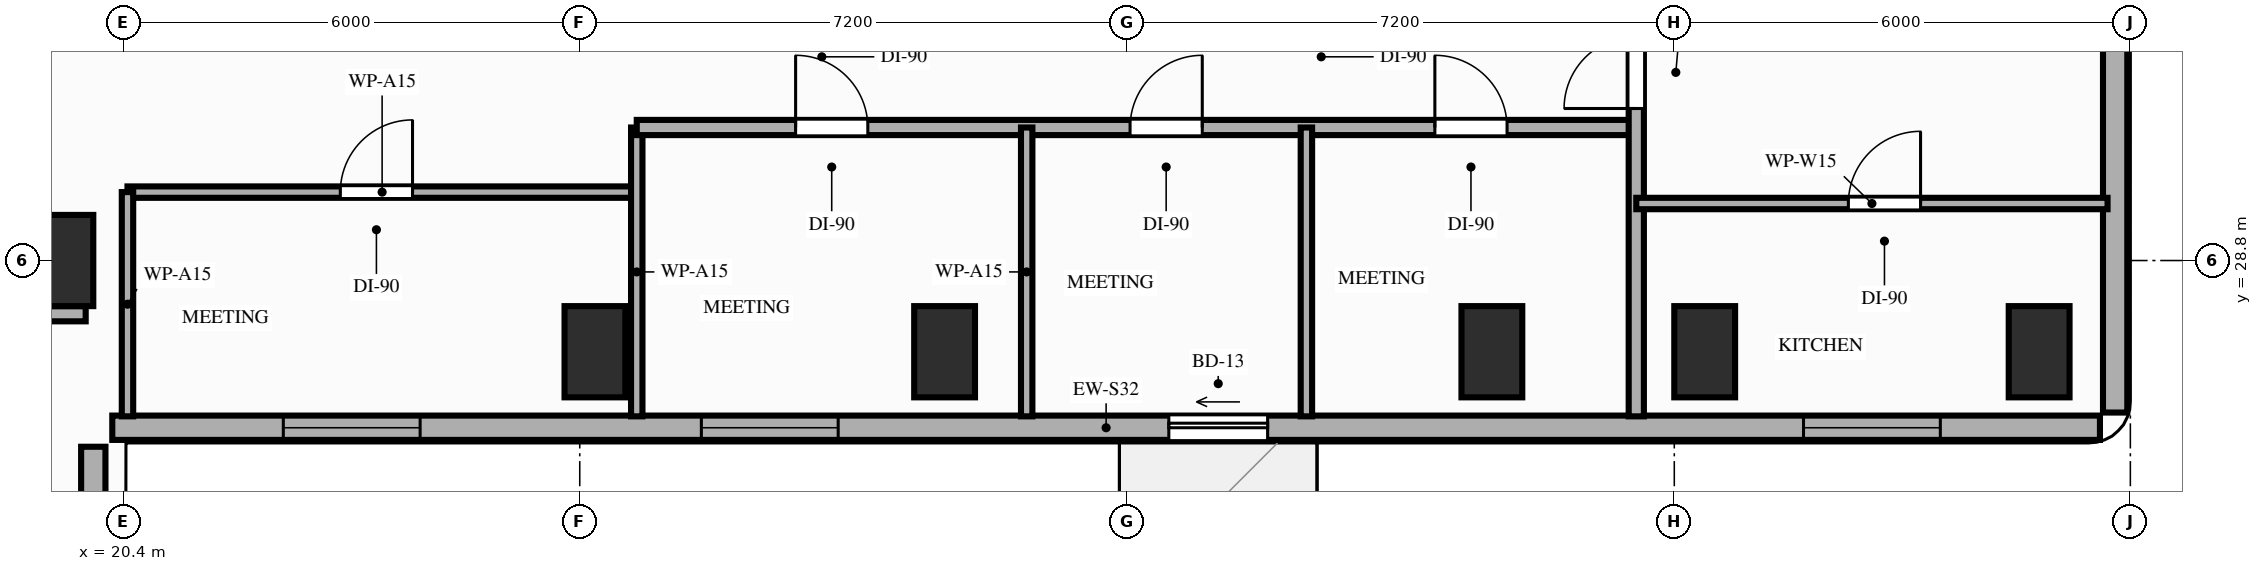
"""IFC4 building model, lengths in metres.
Left out: names, types, materials, properties, quantities, classifications, styles, units other than length and angle.
Written with IfcOpenShell. Run it as: python <this file> out.ifc"""

import sys

from ifc_helpers import new_model, si_unit, direction, frame, frame_2d, origin, origin_2d, place, context, subcontext, project, spatial, rectangle, extrude, element, fill, save


model = new_model("IFC4")
c1 = context("Model", 3, precision=1e-05, world=origin(), true_north=direction((0.0, 1.0)))
c2 = subcontext(c1, "Body", "Model", "MODEL_VIEW")
j1 = project(units=[si_unit("LENGTHUNIT", "METRE"), si_unit("PLANEANGLEUNIT", "RADIAN")], contexts=[c1])
p1 = place(None, origin())
s1 = spatial("IfcSite", under=j1, at=p1, CompositionType="ELEMENT")
p2 = place(p1, origin())
s2 = spatial("IfcBuilding", under=s1, at=p2, CompositionType="ELEMENT")
p3 = place(p2, frame((0.0, 0.0, 89.8)))
s3 = spatial("IfcBuildingStorey", under=s2, at=p3, CompositionType="ELEMENT", Elevation=89.8)
for number, where, z_axis, x_axis in (
    (1, (19.6, 28.8, 0.0), (0.0, 0.0, 1.0), (1.0, 0.0, 0.0)),
    (2, (26.6, 27.6, 0.0), (0.0, 0.0, 1.0), (1.0, 0.0, 0.0)),
    (3, (31.2, 27.6, 0.0), (0.0, 0.0, 1.0), (1.0, 0.0, 0.0)),
    (4, (38.4, 27.6, 0.0), (0.0, 0.0, 1.0), (1.0, 0.0, 0.0)),
    (5, (41.2, 27.6, 0.0), (0.0, 0.0, 1.0), (1.0, 0.0, 0.0)),
    (6, (45.6, 27.6, 0.0), (0.0, 0.0, 1.0), (1.0, 0.0, 0.0)),
):
    element("IfcColumn", number, at=place(p3, frame(where, z_axis=z_axis, x_axis=x_axis)), inside=s3, PredefinedType="COLUMN", context=c2, shape_type="SweptSolid", body=[
        extrude(rectangle(XDim=0.8, YDim=1.2, at=origin_2d()), origin(), (0.0, 0.0, 1.0), 3.2),
    ])
p4 = place(p3, frame((20.0, 8.8, 0.0), z_axis=(0.0, 0.0, 1.0), x_axis=(0.0, 1.0, 0.0)))
e7 = element("IfcWall", 7, at=p4, inside=s3, PredefinedType="STANDARD", context=c2, shape_type="SweptSolid", body=[
    extrude(rectangle(XDim=17.55, YDim=0.32, at=frame_2d((8.775, 0.0))), origin(), (0.0, 0.0, 1.0), 2.4),
])
p5 = place(p4, frame((12.04, 0.0, 0.85)))
e8 = element("IfcOpeningElement", 8, at=p5, cuts=e7, PredefinedType="OPENING", context=c2, shape_type="SweptSolid", body=[
    extrude(rectangle(XDim=1.8, YDim=1.3, at=frame_2d((0.9, 0.65))), frame((0.0, 0.17, 0.0), z_axis=(0.0, -1.0, 0.0), x_axis=(1.0, 0.0, 0.0)), (0.0, 0.0, 1.0), 0.34),
])
p6 = place(p4, frame((5.6, 0.0, 0.85)))
e9 = element("IfcOpeningElement", 9, at=p6, cuts=e7, PredefinedType="OPENING", context=c2, shape_type="SweptSolid", body=[
    extrude(rectangle(XDim=1.8, YDim=1.3, at=frame_2d((0.9, 0.65))), frame((0.0, 0.17, 0.0), z_axis=(0.0, -1.0, 0.0), x_axis=(1.0, 0.0, 0.0)), (0.0, 0.0, 1.0), 0.34),
])
p7 = place(p3, frame((20.25, 26.6, 0.0), z_axis=(0.0, 0.0, 1.0), x_axis=(1.0, 0.0, 0.0)))
e10 = element("IfcWall", 10, at=p7, inside=s3, PredefinedType="STANDARD", context=c2, shape_type="SweptSolid", body=[
    extrude(rectangle(XDim=26.15, YDim=0.32, at=frame_2d((13.075, 0.0))), origin(), (0.0, 0.0, 1.0), 2.7),
])
p8 = place(p7, frame((13.9, 0.0, 0.0)))
e11 = element("IfcOpeningElement", 11, at=p8, cuts=e10, PredefinedType="OPENING", context=c2, shape_type="SweptSolid", body=[
    extrude(rectangle(XDim=1.3, YDim=2.08, at=frame_2d((0.65, 1.04))), frame((0.0, 0.17, 0.0), z_axis=(0.0, -1.0, 0.0), x_axis=(1.0, 0.0, 0.0)), (0.0, 0.0, 1.0), 0.34),
])
p9 = place(p7, frame((2.25, 0.0, 0.85)))
e12 = element("IfcOpeningElement", 12, at=p9, cuts=e10, PredefinedType="OPENING", context=c2, shape_type="SweptSolid", body=[
    extrude(rectangle(XDim=1.8, YDim=1.6, at=frame_2d((0.9, 0.8))), frame((0.0, 0.17, 0.0), z_axis=(0.0, -1.0, 0.0), x_axis=(1.0, 0.0, 0.0)), (0.0, 0.0, 1.0), 0.34),
])
p10 = place(p7, frame((7.75, 0.0, 0.85)))
e13 = element("IfcOpeningElement", 13, at=p10, cuts=e10, PredefinedType="OPENING", context=c2, shape_type="SweptSolid", body=[
    extrude(rectangle(XDim=1.8, YDim=1.6, at=frame_2d((0.9, 0.8))), frame((0.0, 0.17, 0.0), z_axis=(0.0, -1.0, 0.0), x_axis=(1.0, 0.0, 0.0)), (0.0, 0.0, 1.0), 0.34),
])
p11 = place(p7, frame((22.25, 0.0, 0.85)))
e14 = element("IfcOpeningElement", 14, at=p11, cuts=e10, PredefinedType="OPENING", context=c2, shape_type="SweptSolid", body=[
    extrude(rectangle(XDim=1.8, YDim=1.6, at=frame_2d((0.9, 0.8))), frame((0.0, 0.17, 0.0), z_axis=(0.0, -1.0, 0.0), x_axis=(1.0, 0.0, 0.0)), (0.0, 0.0, 1.0), 0.34),
])
p12 = place(p3, frame((46.6, 26.8, 0.0), z_axis=(0.0, 0.0, 1.0), x_axis=(0.0, 1.0, 0.0)))
e15 = element("IfcWall", 15, at=p12, inside=s3, PredefinedType="STANDARD", context=c2, shape_type="SweptSolid", body=[
    extrude(rectangle(XDim=15.35, YDim=0.32, at=frame_2d((7.675, 0.0))), origin(), (0.0, 0.0, 1.0), 3.02),
])
p13 = place(p12, frame((5.68, 0.0, 0.85)))
e16 = element("IfcOpeningElement", 16, at=p13, cuts=e15, PredefinedType="OPENING", context=c2, shape_type="SweptSolid", body=[
    extrude(rectangle(XDim=1.8, YDim=1.75, at=frame_2d((0.9, 0.875))), frame((0.0, 0.17, 0.0), z_axis=(0.0, -1.0, 0.0), x_axis=(1.0, 0.0, 0.0)), (0.0, 0.0, 1.0), 0.34),
])
p14 = place(p3, frame((11.01, 28.1, 0.0), z_axis=(0.0, 0.0, 1.0), x_axis=(1.0, 0.0, 0.0)))
e17 = element("IfcWall", 17, at=p14, inside=s3, PredefinedType="PARTITIONING", context=c2, shape_type="SweptSolid", body=[
    extrude(rectangle(XDim=8.89, YDim=0.2, at=frame_2d((4.445, 0.0))), origin(), (0.0, 0.0, 1.0), 2.4),
])
p15 = place(p3, frame((20.45, 29.7, 0.0), z_axis=(0.0, 0.0, 1.0), x_axis=(1.0, 0.0, 0.0)))
e18 = element("IfcWall", 18, at=p15, inside=s3, PredefinedType="PARTITIONING", context=c2, shape_type="SweptSolid", body=[
    extrude(rectangle(XDim=6.7, YDim=0.15, at=frame_2d((3.35, 0.0))), origin(), (0.0, 0.0, 1.0), 3.02),
])
p16 = place(p15, frame((2.8, 0.0, 0.0)))
e19 = element("IfcOpeningElement", 19, at=p16, cuts=e18, PredefinedType="OPENING", context=c2, shape_type="SweptSolid", body=[
    extrude(rectangle(XDim=0.95, YDim=2.15, at=frame_2d((0.475, 1.075))), frame((0.0, 0.085, 0.0), z_axis=(0.0, -1.0, 0.0), x_axis=(1.0, 0.0, 0.0)), (0.0, 0.0, 1.0), 0.17),
])
p17 = place(p3, frame((20.45, 26.75, 0.0), z_axis=(0.0, 0.0, 1.0), x_axis=(0.0, 1.0, 0.0)))
e20 = element("IfcWall", 20, at=p17, inside=s3, PredefinedType="PARTITIONING", context=c2, shape_type="SweptSolid", body=[
    extrude(rectangle(XDim=2.95, YDim=0.15, at=frame_2d((1.475, 0.0))), origin(), (0.0, 0.0, 1.0), 2.4),
])
p18 = place(p3, frame((27.15, 26.75, 0.0), z_axis=(0.0, 0.0, 1.0), x_axis=(0.0, 1.0, 0.0)))
e21 = element("IfcWall", 21, at=p18, inside=s3, PredefinedType="PARTITIONING", context=c2, shape_type="SweptSolid", body=[
    extrude(rectangle(XDim=3.8, YDim=0.15, at=frame_2d((1.9, 0.0))), origin(), (0.0, 0.0, 1.0), 2.4),
])
p19 = place(p3, frame((27.15, 30.55, 0.0), z_axis=(0.0, 0.0, 1.0), x_axis=(1.0, 0.0, 0.0)))
e22 = element("IfcWall", 22, at=p19, inside=s3, PredefinedType="PARTITIONING", context=c2, shape_type="SweptSolid", body=[
    extrude(rectangle(XDim=13.15, YDim=0.2, at=frame_2d((6.575, 0.0))), origin(), (0.0, 0.0, 1.0), 2.4),
])
p20 = place(p19, frame((2.09, 0.0, 0.0)))
e23 = element("IfcOpeningElement", 23, at=p20, cuts=e22, PredefinedType="OPENING", context=c2, shape_type="SweptSolid", body=[
    extrude(rectangle(XDim=0.95, YDim=2.15, at=frame_2d((0.475, 1.075))), frame((0.0, 0.11, 0.0), z_axis=(0.0, -1.0, 0.0), x_axis=(1.0, 0.0, 0.0)), (0.0, 0.0, 1.0), 0.22),
])
p21 = place(p19, frame((6.49, 0.0, 0.0)))
e24 = element("IfcOpeningElement", 24, at=p21, cuts=e22, PredefinedType="OPENING", context=c2, shape_type="SweptSolid", body=[
    extrude(rectangle(XDim=0.95, YDim=2.15, at=frame_2d((0.475, 1.075))), frame((0.0, 0.11, 0.0), z_axis=(0.0, -1.0, 0.0), x_axis=(1.0, 0.0, 0.0)), (0.0, 0.0, 1.0), 0.22),
])
p22 = place(p19, frame((10.5, 0.0, 0.0)))
e25 = element("IfcOpeningElement", 25, at=p22, cuts=e22, PredefinedType="OPENING", context=c2, shape_type="SweptSolid", body=[
    extrude(rectangle(XDim=0.95, YDim=2.15, at=frame_2d((0.475, 1.075))), frame((0.0, 0.11, 0.0), z_axis=(0.0, -1.0, 0.0), x_axis=(1.0, 0.0, 0.0)), (0.0, 0.0, 1.0), 0.22),
])
p23 = place(p3, frame((40.3, 26.75, 0.0), z_axis=(0.0, 0.0, 1.0), x_axis=(0.0, 1.0, 0.0)))
e26 = element("IfcWall", 26, at=p23, inside=s3, PredefinedType="PARTITIONING", context=c2, shape_type="SweptSolid", body=[
    extrude(rectangle(XDim=15.45, YDim=0.2, at=frame_2d((7.725, 0.0))), origin(), (0.0, 0.0, 1.0), 2.4),
])
p24 = place(p23, frame((4.05, 0.0, 0.0)))
e27 = element("IfcOpeningElement", 27, at=p24, cuts=e26, PredefinedType="OPENING", context=c2, shape_type="SweptSolid", body=[
    extrude(rectangle(XDim=0.95, YDim=2.15, at=frame_2d((0.475, 1.075))), frame((0.0, 0.11, 0.0), z_axis=(0.0, -1.0, 0.0), x_axis=(1.0, 0.0, 0.0)), (0.0, 0.0, 1.0), 0.22),
])
p25 = place(p3, frame((40.3, 29.55, 0.0), z_axis=(0.0, 0.0, 1.0), x_axis=(1.0, 0.0, 0.0)))
e28 = element("IfcWall", 28, at=p25, inside=s3, PredefinedType="PARTITIONING", context=c2, shape_type="SweptSolid", body=[
    extrude(rectangle(XDim=6.2, YDim=0.15, at=frame_2d((3.1, 0.0))), origin(), (0.0, 0.0, 1.0), 2.4),
])
p26 = place(p25, frame((2.79, 0.0, 0.0)))
e29 = element("IfcOpeningElement", 29, at=p26, cuts=e28, PredefinedType="OPENING", context=c2, shape_type="SweptSolid", body=[
    extrude(rectangle(XDim=0.95, YDim=2.15, at=frame_2d((0.475, 1.075))), frame((0.0, 0.085, 0.0), z_axis=(0.0, -1.0, 0.0), x_axis=(1.0, 0.0, 0.0)), (0.0, 0.0, 1.0), 0.17),
])
for number, where, z_axis, x_axis in (
    (30, (32.28, 26.75, 0.0), (0.0, 0.0, 1.0), (0.0, 1.0, 0.0)),
    (31, (35.96, 26.75, 0.0), (0.0, 0.0, 1.0), (0.0, 1.0, 0.0)),
):
    element("IfcWall", number, at=place(p3, frame(where, z_axis=z_axis, x_axis=x_axis)), inside=s3, PredefinedType="PARTITIONING", context=c2, shape_type="SweptSolid", body=[
        extrude(rectangle(XDim=3.8, YDim=0.15, at=frame_2d((1.9, 0.0))), origin(), (0.0, 0.0, 1.0), 2.4),
    ])
p27 = place(p8, origin())
e32 = element("IfcDoor", 32, at=p27, inside=s3, OperationType="SLIDING_TO_LEFT", PredefinedType="DOOR", context=c2, shape_type="SweptSolid", body=[
    extrude(rectangle(XDim=1.3, YDim=2.08, at=frame_2d((0.65, 1.04))), frame((0.0, 0.025, 0.0), z_axis=(0.0, -1.0, 0.0), x_axis=(1.0, 0.0, 0.0)), (0.0, 0.0, 1.0), 0.05),
])
fill(e11, e32)
p28 = place(p9, origin())
e33 = element("IfcWindow", 33, at=p28, inside=s3, PartitioningType="SINGLE_PANEL", PredefinedType="WINDOW", context=c2, shape_type="SweptSolid", body=[
    extrude(rectangle(XDim=1.8, YDim=1.6, at=frame_2d((0.9, 0.8))), frame((0.0, 0.03, 0.0), z_axis=(0.0, -1.0, 0.0), x_axis=(1.0, 0.0, 0.0)), (0.0, 0.0, 1.0), 0.06),
])
fill(e12, e33)
p29 = place(p10, origin())
e34 = element("IfcWindow", 34, at=p29, inside=s3, PartitioningType="SINGLE_PANEL", PredefinedType="WINDOW", context=c2, shape_type="SweptSolid", body=[
    extrude(rectangle(XDim=1.8, YDim=1.6, at=frame_2d((0.9, 0.8))), frame((0.0, 0.03, 0.0), z_axis=(0.0, -1.0, 0.0), x_axis=(1.0, 0.0, 0.0)), (0.0, 0.0, 1.0), 0.06),
])
fill(e13, e34)
p30 = place(p11, origin())
e35 = element("IfcWindow", 35, at=p30, inside=s3, PartitioningType="SINGLE_PANEL", PredefinedType="WINDOW", context=c2, shape_type="SweptSolid", body=[
    extrude(rectangle(XDim=1.8, YDim=1.6, at=frame_2d((0.9, 0.8))), frame((0.0, 0.03, 0.0), z_axis=(0.0, -1.0, 0.0), x_axis=(1.0, 0.0, 0.0)), (0.0, 0.0, 1.0), 0.06),
])
fill(e14, e35)
p31 = place(p16, origin())
e36 = element("IfcDoor", 36, at=p31, inside=s3, OperationType="SINGLE_SWING_RIGHT", PredefinedType="DOOR", context=c2, shape_type="SweptSolid", body=[
    extrude(rectangle(XDim=0.95, YDim=2.15, at=frame_2d((0.475, 1.075))), frame((0.0, 0.025, 0.0), z_axis=(0.0, -1.0, 0.0), x_axis=(1.0, 0.0, 0.0)), (0.0, 0.0, 1.0), 0.05),
])
fill(e19, e36)
p32 = place(p24, origin())
e37 = element("IfcDoor", 37, at=p32, inside=s3, OperationType="SINGLE_SWING_LEFT", PredefinedType="DOOR", context=c2, shape_type="SweptSolid", body=[
    extrude(rectangle(XDim=0.95, YDim=2.15, at=frame_2d((0.475, 1.075))), frame((0.0, 0.025, 0.0), z_axis=(0.0, -1.0, 0.0), x_axis=(1.0, 0.0, 0.0)), (0.0, 0.0, 1.0), 0.05),
])
fill(e27, e37)
p33 = place(p26, origin())
e38 = element("IfcDoor", 38, at=p33, inside=s3, OperationType="SINGLE_SWING_RIGHT", PredefinedType="DOOR", context=c2, shape_type="SweptSolid", body=[
    extrude(rectangle(XDim=0.95, YDim=2.15, at=frame_2d((0.475, 1.075))), frame((0.0, 0.025, 0.0), z_axis=(0.0, -1.0, 0.0), x_axis=(1.0, 0.0, 0.0)), (0.0, 0.0, 1.0), 0.05),
])
fill(e29, e38)
p34 = place(p20, origin())
e39 = element("IfcDoor", 39, at=p34, inside=s3, OperationType="SINGLE_SWING_LEFT", PredefinedType="DOOR", context=c2, shape_type="SweptSolid", body=[
    extrude(rectangle(XDim=0.95, YDim=2.15, at=frame_2d((0.475, 1.075))), frame((0.0, 0.025, 0.0), z_axis=(0.0, -1.0, 0.0), x_axis=(1.0, 0.0, 0.0)), (0.0, 0.0, 1.0), 0.05),
])
fill(e23, e39)
p35 = place(p21, origin())
e40 = element("IfcDoor", 40, at=p35, inside=s3, OperationType="SINGLE_SWING_RIGHT", PredefinedType="DOOR", context=c2, shape_type="SweptSolid", body=[
    extrude(rectangle(XDim=0.95, YDim=2.15, at=frame_2d((0.475, 1.075))), frame((0.0, 0.025, 0.0), z_axis=(0.0, -1.0, 0.0), x_axis=(1.0, 0.0, 0.0)), (0.0, 0.0, 1.0), 0.05),
])
fill(e24, e40)
p36 = place(p22, origin())
e41 = element("IfcDoor", 41, at=p36, inside=s3, OperationType="SINGLE_SWING_LEFT", PredefinedType="DOOR", context=c2, shape_type="SweptSolid", body=[
    extrude(rectangle(XDim=0.95, YDim=2.15, at=frame_2d((0.475, 1.075))), frame((0.0, 0.025, 0.0), z_axis=(0.0, -1.0, 0.0), x_axis=(1.0, 0.0, 0.0)), (0.0, 0.0, 1.0), 0.05),
])
fill(e25, e41)
save(model, sys.argv[1])
